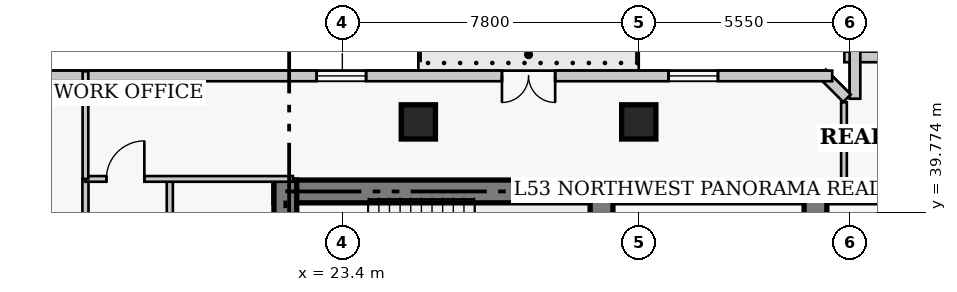
"""IFC4 building model, lengths in metres.
Left out: names, types, materials, properties, quantities, classifications, styles, units other than length and angle.
Written with IfcOpenShell. Run it as: python <this file> out.ifc"""

import sys

from ifc_helpers import new_model, si_unit, direction, frame, frame_2d, origin, origin_2d, place, context, subcontext, project, spatial, rectangle, extrude, element, fill, save


model = new_model("IFC4")
c1 = context("Model", 3, precision=1e-05, world=origin(), true_north=direction((0.0, 1.0)))
c2 = subcontext(c1, "Body", "Model", "MODEL_VIEW")
j1 = project(units=[si_unit("LENGTHUNIT", "METRE"), si_unit("PLANEANGLEUNIT", "RADIAN")], contexts=[c1])
p1 = place(None, origin())
s1 = spatial("IfcSite", under=j1, at=p1, CompositionType="ELEMENT")
p2 = place(p1, origin())
s2 = spatial("IfcBuilding", under=s1, at=p2, CompositionType="ELEMENT")
p3 = place(p2, frame((0.0, 0.0, 212.4)))
s3 = spatial("IfcBuildingStorey", under=s2, at=p3, CompositionType="ELEMENT", Elevation=212.4)
p4 = place(p3, frame((21.6, 40.32, 0.0), z_axis=(0.0, 0.0, 1.0), x_axis=(1.0, 0.0, 0.0)))
e1 = element("IfcWall", 1, at=p4, inside=s3, PredefinedType="SHEAR", context=c2, shape_type="SweptSolid", body=[
    extrude(rectangle(XDim=14.25, YDim=0.6, at=frame_2d((7.125, 0.0))), origin(), (0.0, 0.0, 1.0), 3.9),
])
p5 = place(p3, frame((35.85, 40.32, 0.0), z_axis=(0.0, 0.0, 1.0), x_axis=(1.0, 0.0, 0.0)))
e2 = element("IfcWall", 2, at=p5, inside=s3, PredefinedType="SHEAR", context=c2, shape_type="SweptSolid", body=[
    extrude(rectangle(XDim=12.6, YDim=0.6, at=frame_2d((6.3, 0.0))), origin(), (0.0, 0.0, 1.0), 3.9),
])
p6 = place(p3, frame((21.9, 27.05, 0.0), z_axis=(0.0, 0.0, 1.0), x_axis=(0.0, 1.0, 0.0)))
e3 = element("IfcWall", 3, at=p6, inside=s3, PredefinedType="SHEAR", context=c2, shape_type="SweptSolid", body=[
    extrude(rectangle(XDim=13.57, YDim=0.6, at=frame_2d((6.785, 0.0))), origin(), (0.0, 0.0, 1.0), 3.9),
])
p7 = place(p3, frame((30.22, 33.05, 0.0), z_axis=(0.0, 0.0, 1.0), x_axis=(0.0, 1.0, 0.0)))
e4 = element("IfcWall", 4, at=p7, inside=s3, PredefinedType="SHEAR", context=c2, shape_type="SweptSolid", body=[
    extrude(rectangle(XDim=7.27, YDim=0.6, at=frame_2d((3.635, 0.0))), origin(), (0.0, 0.0, 1.0), 3.9),
])
p8 = place(p3, frame((35.85, 36.37, 0.0), z_axis=(0.0, 0.0, 1.0), x_axis=(0.0, 1.0, 0.0)))
e5 = element("IfcWall", 5, at=p8, inside=s3, PredefinedType="SHEAR", context=c2, shape_type="SweptSolid", body=[
    extrude(rectangle(XDim=3.95, YDim=0.6, at=frame_2d((1.975, 0.0))), origin(), (0.0, 0.0, 1.0), 3.9),
])
p9 = place(p8, frame((0.88, 0.0, 0.0)))
e6 = element("IfcOpeningElement", 6, at=p9, cuts=e5, PredefinedType="OPENING", context=c2, shape_type="SweptSolid", body=[
    extrude(rectangle(XDim=1.1, YDim=2.15, at=frame_2d((0.55, 1.075))), frame((0.0, 0.31, 0.0), z_axis=(0.0, -1.0, 0.0), x_axis=(1.0, 0.0, 0.0)), (0.0, 0.0, 1.0), 0.62),
])
for number, where, z_axis, x_axis in (
    (7, (25.4, 42.15, 0.0), (0.0, 0.0, 1.0), (1.0, 0.0, 0.0)),
    (8, (31.2, 42.15, 0.0), (0.0, 0.0, 1.0), (1.0, 0.0, 0.0)),
):
    element("IfcColumn", number, at=place(p3, frame(where, z_axis=z_axis, x_axis=x_axis)), inside=s3, PredefinedType="COLUMN", context=c2, shape_type="SweptSolid", body=[
        extrude(rectangle(XDim=0.9, YDim=0.9, at=origin_2d()), origin(), (0.0, 0.0, 1.0), 3.9),
    ])
p10 = place(p3, frame((41.39, 43.86, 0.0), z_axis=(0.0, 0.0, 1.0), x_axis=(-1.0, 0.0, 0.0)))
e9 = element("IfcWall", 9, at=p10, inside=s3, PredefinedType="SOLIDWALL", context=c2, shape_type="SweptSolid", body=[
    extrude(rectangle(XDim=4.78, YDim=0.28, at=frame_2d((2.39, 0.0))), origin(), (0.0, 0.0, 1.0), 3.65),
])
p11 = place(p10, frame((1.74, 0.0, 0.85)))
e10 = element("IfcOpeningElement", 10, at=p11, cuts=e9, PredefinedType="OPENING", context=c2, shape_type="SweptSolid", body=[
    extrude(rectangle(XDim=1.3, YDim=1.7, at=frame_2d((0.65, 0.85))), frame((0.0, 0.15, 0.0), z_axis=(0.0, -1.0, 0.0), x_axis=(1.0, 0.0, 0.0)), (0.0, 0.0, 1.0), 0.3),
])
p12 = place(p3, frame((36.89, 44.14, 0.0), z_axis=(0.0, 0.0, 1.0), x_axis=(0.0, -1.0, 0.0)))
e11 = element("IfcWall", 11, at=p12, inside=s3, PredefinedType="SOLIDWALL", context=c2, shape_type="SweptSolid", body=[
    extrude(rectangle(XDim=1.38, YDim=0.28, at=frame_2d((0.69, 0.0))), origin(), (0.0, 0.0, 1.0), 3.65),
])
p13 = place(p3, frame((36.679, 42.773, 0.0), z_axis=(0.0, 0.0, 1.0), x_axis=(-0.707106781187, 0.707106781187, 0.0)))
e12 = element("IfcWall", 12, at=p13, inside=s3, PredefinedType="SOLIDWALL", context=c2, shape_type="SweptSolid", body=[
    extrude(rectangle(XDim=0.928, YDim=0.28, at=frame_2d((0.464, 0.0))), origin(), (0.0, 0.0, 1.0), 3.65),
])
p14 = place(p3, frame((36.29, 43.36, 0.0), z_axis=(0.0, 0.0, 1.0), x_axis=(-1.0, 0.0, 0.0)))
e13 = element("IfcWall", 13, at=p14, inside=s3, PredefinedType="SOLIDWALL", context=c2, shape_type="SweptSolid", body=[
    extrude(rectangle(XDim=25.83, YDim=0.28, at=frame_2d((12.915, 0.0))), origin(), (0.0, 0.0, 1.0), 3.65),
])
p15 = place(p14, frame((7.29, 0.0, 0.0)))
e14 = element("IfcOpeningElement", 14, at=p15, cuts=e13, PredefinedType="OPENING", context=c2, shape_type="SweptSolid", body=[
    extrude(rectangle(XDim=1.4, YDim=2.15, at=frame_2d((0.7, 1.075))), frame((0.0, 0.15, 0.0), z_axis=(0.0, -1.0, 0.0), x_axis=(1.0, 0.0, 0.0)), (0.0, 0.0, 1.0), 0.3),
])
p16 = place(p14, frame((3.005, 0.0, 0.85)))
e15 = element("IfcOpeningElement", 15, at=p16, cuts=e13, PredefinedType="OPENING", context=c2, shape_type="SweptSolid", body=[
    extrude(rectangle(XDim=1.3, YDim=1.7, at=frame_2d((0.65, 0.85))), frame((0.0, 0.15, 0.0), z_axis=(0.0, -1.0, 0.0), x_axis=(1.0, 0.0, 0.0)), (0.0, 0.0, 1.0), 0.3),
])
p17 = place(p14, frame((12.265, 0.0, 0.85)))
e16 = element("IfcOpeningElement", 16, at=p17, cuts=e13, PredefinedType="OPENING", context=c2, shape_type="SweptSolid", body=[
    extrude(rectangle(XDim=1.3, YDim=1.7, at=frame_2d((0.65, 0.85))), frame((0.0, 0.15, 0.0), z_axis=(0.0, -1.0, 0.0), x_axis=(1.0, 0.0, 0.0)), (0.0, 0.0, 1.0), 0.3),
])
p18 = place(p14, frame((20.875, 0.0, 0.85)))
e17 = element("IfcOpeningElement", 17, at=p18, cuts=e13, PredefinedType="OPENING", context=c2, shape_type="SweptSolid", body=[
    extrude(rectangle(XDim=1.3, YDim=1.7, at=frame_2d((0.65, 0.85))), frame((0.0, 0.15, 0.0), z_axis=(0.0, -1.0, 0.0), x_axis=(1.0, 0.0, 0.0)), (0.0, 0.0, 1.0), 0.3),
])
p19 = place(p3, frame((16.64, 7.55, 0.0), z_axis=(0.0, 0.0, 1.0), x_axis=(0.0, 1.0, 0.0)))
e18 = element("IfcWall", 18, at=p19, inside=s3, PredefinedType="PARTITIONING", context=c2, shape_type="SweptSolid", body=[
    extrude(rectangle(XDim=33.1, YDim=0.16, at=frame_2d((16.55, 0.0))), origin(), (0.0, 0.0, 1.0), 3.65),
])
p20 = place(p19, frame((0.46, 0.0, 0.0)))
e19 = element("IfcOpeningElement", 19, at=p20, cuts=e18, PredefinedType="OPENING", context=c2, shape_type="SweptSolid", body=[
    extrude(rectangle(XDim=0.95, YDim=2.1, at=frame_2d((0.475, 1.05))), frame((0.0, 0.09, 0.0), z_axis=(0.0, -1.0, 0.0), x_axis=(1.0, 0.0, 0.0)), (0.0, 0.0, 1.0), 0.18),
])
p21 = place(p19, frame((7.575, 0.0, 0.0)))
e20 = element("IfcOpeningElement", 20, at=p21, cuts=e18, PredefinedType="OPENING", context=c2, shape_type="SweptSolid", body=[
    extrude(rectangle(XDim=0.95, YDim=2.1, at=frame_2d((0.475, 1.05))), frame((0.0, 0.09, 0.0), z_axis=(0.0, -1.0, 0.0), x_axis=(1.0, 0.0, 0.0)), (0.0, 0.0, 1.0), 0.18),
])
p22 = place(p19, frame((14.178, 0.0, 0.0)))
e21 = element("IfcOpeningElement", 21, at=p22, cuts=e18, PredefinedType="OPENING", context=c2, shape_type="SweptSolid", body=[
    extrude(rectangle(XDim=0.95, YDim=2.1, at=frame_2d((0.475, 1.05))), frame((0.0, 0.09, 0.0), z_axis=(0.0, -1.0, 0.0), x_axis=(1.0, 0.0, 0.0)), (0.0, 0.0, 1.0), 0.18),
])
p23 = place(p19, frame((28.4, 0.0, 0.0)))
e22 = element("IfcOpeningElement", 22, at=p23, cuts=e18, PredefinedType="OPENING", context=c2, shape_type="SweptSolid", body=[
    extrude(rectangle(XDim=1.0, YDim=2.15, at=frame_2d((0.5, 1.075))), frame((0.0, 0.09, 0.0), z_axis=(0.0, -1.0, 0.0), x_axis=(1.0, 0.0, 0.0)), (0.0, 0.0, 1.0), 0.18),
])
p24 = place(p3, frame((18.86, 35.02, 0.0), z_axis=(0.0, 0.0, 1.0), x_axis=(0.0, 1.0, 0.0)))
e23 = element("IfcWall", 23, at=p24, inside=s3, PredefinedType="PARTITIONING", context=c2, shape_type="SweptSolid", body=[
    extrude(rectangle(XDim=5.63, YDim=0.16, at=frame_2d((2.815, 0.0))), origin(), (0.0, 0.0, 1.0), 3.65),
])
p25 = place(p3, frame((16.64, 40.65, 0.0), z_axis=(0.0, 0.0, 1.0), x_axis=(1.0, 0.0, 0.0)))
e24 = element("IfcWall", 24, at=p25, inside=s3, PredefinedType="PARTITIONING", context=c2, shape_type="SweptSolid", body=[
    extrude(rectangle(XDim=5.46, YDim=0.15, at=frame_2d((2.73, 0.0))), origin(), (0.0, 0.0, 1.0), 3.65),
])
p26 = place(p25, frame((0.55, 0.0, 0.0)))
e25 = element("IfcOpeningElement", 25, at=p26, cuts=e24, PredefinedType="OPENING", context=c2, shape_type="SweptSolid", body=[
    extrude(rectangle(XDim=1.0, YDim=2.15, at=frame_2d((0.5, 1.075))), frame((0.0, 0.085, 0.0), z_axis=(0.0, -1.0, 0.0), x_axis=(1.0, 0.0, 0.0)), (0.0, 0.0, 1.0), 0.17),
])
p27 = place(p3, frame((16.64, 40.65, 0.0), z_axis=(0.0, 0.0, 1.0), x_axis=(0.0, 1.0, 0.0)))
e26 = element("IfcWall", 26, at=p27, inside=s3, PredefinedType="PARTITIONING", context=c2, shape_type="SweptSolid", body=[
    extrude(rectangle(XDim=2.83, YDim=0.15, at=frame_2d((1.415, 0.0))), origin(), (0.0, 0.0, 1.0), 3.65),
])
p28 = place(p3, frame((36.6, 40.32, 0.0), z_axis=(0.0, 0.0, 1.0), x_axis=(0.0, 1.0, 0.0)))
e27 = element("IfcWall", 27, at=p28, inside=s3, PredefinedType="PARTITIONING", context=c2, shape_type="SweptSolid", body=[
    extrude(rectangle(XDim=2.345, YDim=0.15, at=frame_2d((1.172, 0.0))), origin(), (0.0, 0.0, 1.0), 3.65),
])
p29 = place(p15, origin())
e28 = element("IfcDoor", 28, at=p29, inside=s3, OperationType="DOUBLE_DOOR_SINGLE_SWING", PredefinedType="DOOR", context=c2, shape_type="SweptSolid", body=[
    extrude(rectangle(XDim=1.4, YDim=2.15, at=frame_2d((0.7, 1.075))), frame((0.0, 0.025, 0.0), z_axis=(0.0, -1.0, 0.0), x_axis=(1.0, 0.0, 0.0)), (0.0, 0.0, 1.0), 0.05),
])
fill(e14, e28)
p30 = place(p16, origin())
e29 = element("IfcWindow", 29, at=p30, inside=s3, PartitioningType="SINGLE_PANEL", PredefinedType="WINDOW", context=c2, shape_type="SweptSolid", body=[
    extrude(rectangle(XDim=1.3, YDim=1.7, at=frame_2d((0.65, 0.85))), frame((0.0, 0.03, 0.0), z_axis=(0.0, -1.0, 0.0), x_axis=(1.0, 0.0, 0.0)), (0.0, 0.0, 1.0), 0.06),
])
fill(e15, e29)
p31 = place(p17, origin())
e30 = element("IfcWindow", 30, at=p31, inside=s3, PartitioningType="SINGLE_PANEL", PredefinedType="WINDOW", context=c2, shape_type="SweptSolid", body=[
    extrude(rectangle(XDim=1.3, YDim=1.7, at=frame_2d((0.65, 0.85))), frame((0.0, 0.03, 0.0), z_axis=(0.0, -1.0, 0.0), x_axis=(1.0, 0.0, 0.0)), (0.0, 0.0, 1.0), 0.06),
])
fill(e16, e30)
p32 = place(p26, origin())
e31 = element("IfcDoor", 31, at=p32, inside=s3, OperationType="SINGLE_SWING_RIGHT", PredefinedType="DOOR", context=c2, shape_type="SweptSolid", body=[
    extrude(rectangle(XDim=1.0, YDim=2.15, at=frame_2d((0.5, 1.075))), frame((0.0, 0.025, 0.0), z_axis=(0.0, -1.0, 0.0), x_axis=(1.0, 0.0, 0.0)), (0.0, 0.0, 1.0), 0.05),
])
fill(e25, e31)
save(model, sys.argv[1])
